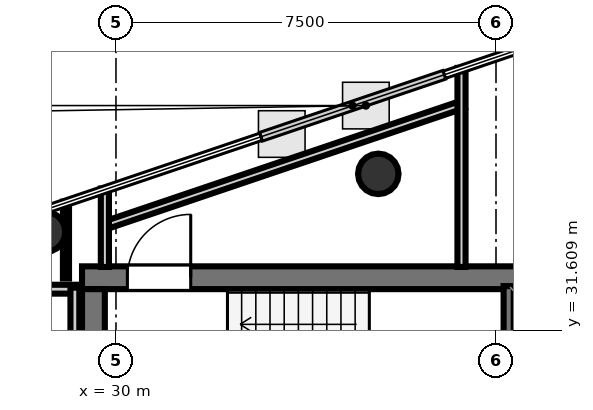
"""IFC4 building model, lengths in metres.
Left out: names, types, materials, properties, quantities, classifications, styles, units other than length and angle.
Written with IfcOpenShell. Run it as: python <this file> out.ifc"""

import sys

from ifc_helpers import new_model, si_unit, direction, frame, frame_2d, origin, origin_2d, place, context, subcontext, project, spatial, rectangle, hollow_circle, extrude, element, fill, save


model = new_model("IFC4")
c1 = context("Model", 3, precision=1e-05, world=origin(), true_north=direction((0.0, 1.0)))
c2 = subcontext(c1, "Body", "Model", "MODEL_VIEW")
j1 = project(units=[si_unit("LENGTHUNIT", "METRE"), si_unit("PLANEANGLEUNIT", "RADIAN")], contexts=[c1])
p1 = place(None, origin())
s1 = spatial("IfcSite", under=j1, at=p1, CompositionType="ELEMENT")
p2 = place(p1, origin())
s2 = spatial("IfcBuilding", under=s1, at=p2, CompositionType="ELEMENT")
p3 = place(p2, frame((0.0, 0.0, 333.3)))
s3 = spatial("IfcBuildingStorey", under=s2, at=p3, CompositionType="ELEMENT", Elevation=333.3)
p4 = place(p3, frame((29.33, 32.645, 0.0), z_axis=(0.0, 0.0, 1.0), x_axis=(1.0, 0.0, 0.0)))
e1 = element("IfcWall", 1, at=p4, inside=s3, PredefinedType="SHEAR", context=c2, shape_type="SweptSolid", body=[
    extrude(rectangle(XDim=10.52, YDim=0.45, at=frame_2d((5.26, 0.0))), origin(), (0.0, 0.0, 1.0), 3.52),
])
p5 = place(p4, frame((0.895, 0.0, 0.0)))
e2 = element("IfcOpeningElement", 2, at=p5, cuts=e1, PredefinedType="OPENING", context=c2, shape_type="SweptSolid", body=[
    extrude(rectangle(XDim=1.25, YDim=2.15, at=frame_2d((0.625, 1.075))), frame((0.0, 0.235, 0.0), z_axis=(0.0, -1.0, 0.0), x_axis=(1.0, 0.0, 0.0)), (0.0, 0.0, 1.0), 0.47),
])
p6 = place(p3, frame((29.555, 24.98, 0.0), z_axis=(0.0, 0.0, 1.0), x_axis=(0.0, 1.0, 0.0)))
e3 = element("IfcWall", 3, at=p6, inside=s3, PredefinedType="SHEAR", context=c2, shape_type="SweptSolid", body=[
    extrude(rectangle(XDim=7.44, YDim=0.45, at=frame_2d((3.72, 0.0))), origin(), (0.0, 0.0, 1.0), 3.52),
])
for number, where, z_axis, x_axis in (
    (4, (28.6, 33.55, 0.0), (0.0, 0.0, 1.0), (1.0, 0.0, 0.0)),
    (5, (35.177, 34.695, 0.0), (0.0, 0.0, 1.0), (1.0, 0.0, 0.0)),
):
    element("IfcColumn", number, at=place(p3, frame(where, z_axis=z_axis, x_axis=x_axis)), inside=s3, PredefinedType="COLUMN", context=c2, shape_type="SweptSolid", body=[
        extrude(hollow_circle(Radius=0.4, WallThickness=0.022, at=origin_2d()), origin(), (0.0, 0.0, 1.0), 3.7),
    ])
p7 = place(p3, frame((37.75, 30.12, 0.0), z_axis=(0.0, 0.0, 1.0), x_axis=(0.0, 1.0, 0.0)))
e6 = element("IfcWall", 6, at=p7, inside=s3, PredefinedType="SOLIDWALL", context=c2, shape_type="SweptSolid", body=[
    extrude(rectangle(XDim=2.36, YDim=0.2, at=frame_2d((1.18, 0.0))), origin(), (0.0, 0.0, 1.0), 3.52),
])
p8 = place(p3, frame((29.76, 33.669, 0.0), z_axis=(0.0, 0.0, 1.0), x_axis=(0.947283213355, 0.32039743085, 0.0)))
e7 = element("IfcWall", 7, at=p8, inside=s3, PredefinedType="PARTITIONING", context=c2, shape_type="SweptSolid", body=[
    extrude(rectangle(XDim=7.495, YDim=0.16, at=frame_2d((3.748, 0.0))), origin(), (0.0, 0.0, 1.0), 2.84),
])
p9 = place(p3, frame((36.819, 36.785, 0.0), z_axis=(0.0, 0.0, 1.0), x_axis=(0.0, -1.0, 0.0)))
e8 = element("IfcWall", 8, at=p9, inside=s3, PredefinedType="PARTITIONING", context=c2, shape_type="SweptSolid", body=[
    extrude(rectangle(XDim=3.927, YDim=0.16, at=frame_2d((1.964, 0.0))), origin(), (0.0, 0.0, 1.0), 2.84),
])
p10 = place(p3, frame((29.781, 32.858, 0.0), z_axis=(0.0, 0.0, 1.0), x_axis=(0.0, 1.0, 0.0)))
e9 = element("IfcWall", 9, at=p10, inside=s3, PredefinedType="PARTITIONING", context=c2, shape_type="SweptSolid", body=[
    extrude(rectangle(XDim=1.547, YDim=0.16, at=frame_2d((0.773, 0.0))), origin(), (0.0, 0.0, 1.0), 2.84),
])
p11 = place(p3, frame((27.72, 32.419, 0.0), z_axis=(0.0, 0.0, 1.0), x_axis=(1.0, 0.0, 0.0)))
e10 = element("IfcWall", 10, at=p11, inside=s3, PredefinedType="PLUMBINGWALL", context=c2, shape_type="SweptSolid", body=[
    extrude(rectangle(XDim=1.5, YDim=0.175, at=frame_2d((0.75, 0.0))), origin(), (0.0, 0.0, 1.0), 2.84),
])
p12 = place(p3, frame((29.189, 32.45, 0.0), z_axis=(0.0, 0.0, 1.0), x_axis=(0.0, -1.0, 0.0)))
e11 = element("IfcWall", 11, at=p12, inside=s3, PredefinedType="PLUMBINGWALL", context=c2, shape_type="SweptSolid", body=[
    extrude(rectangle(XDim=3.17, YDim=0.175, at=frame_2d((1.585, 0.0))), origin(), (0.0, 0.0, 1.0), 2.84),
])
p13 = place(p3, frame((29.013, 32.63, 0.0), z_axis=(0.0, 0.0, 1.0), x_axis=(0.0, 1.0, 0.0)))
e12 = element("IfcWall", 12, at=p13, inside=s3, PredefinedType="PARTITIONING", context=c2, shape_type="SweptSolid", body=[
    extrude(rectangle(XDim=1.515, YDim=0.12, at=frame_2d((0.758, 0.0))), origin(), (0.0, 0.0, 1.0), 2.84),
])
p14 = place(p5, origin())
e13 = element("IfcDoor", 13, at=p14, inside=s3, OperationType="SINGLE_SWING_RIGHT", PredefinedType="DOOR", context=c2, shape_type="SweptSolid", body=[
    extrude(rectangle(XDim=1.25, YDim=2.15, at=frame_2d((0.625, 1.075))), frame((0.0, 0.025, 0.0), z_axis=(0.0, -1.0, 0.0), x_axis=(1.0, 0.0, 0.0)), (0.0, 0.0, 1.0), 0.05),
])
fill(e2, e13)
save(model, sys.argv[1])
